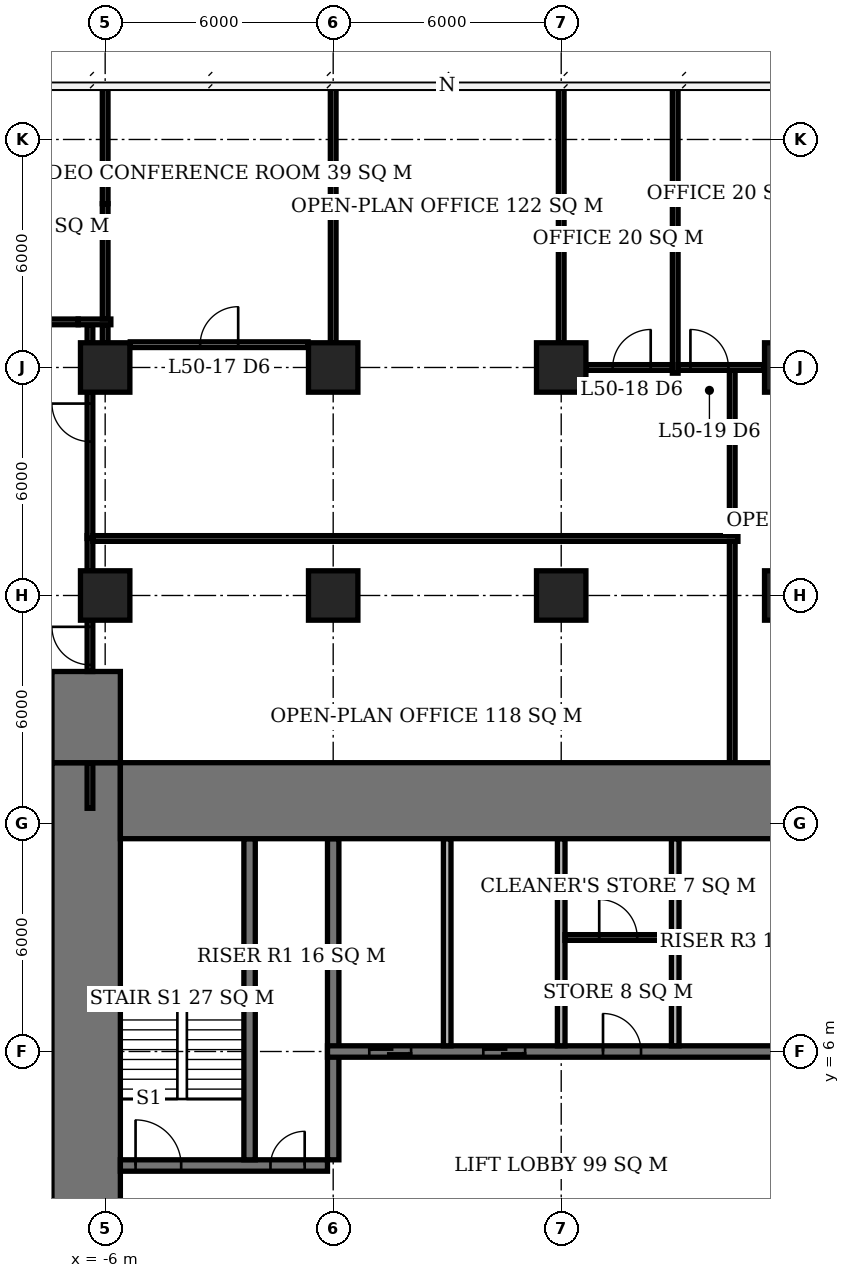
"""IFC4 building model, lengths in metres.
Left out: names, types, materials, properties, quantities, classifications, styles, units other than length and angle.
Written with IfcOpenShell. Run it as: python <this file> out.ifc"""

import sys

from ifc_helpers import new_model, si_unit, direction, frame, frame_2d, origin, origin_2d, place, context, subcontext, project, spatial, rectangle, extrude, element, fill, save


model = new_model("IFC4")
c1 = context("Model", 3, precision=1e-05, world=origin(), true_north=direction((0.0, 1.0)))
c2 = subcontext(c1, "Body", "Model", "MODEL_VIEW")
j1 = project(units=[si_unit("LENGTHUNIT", "METRE"), si_unit("PLANEANGLEUNIT", "RADIAN")], contexts=[c1])
p1 = place(None, origin())
s1 = spatial("IfcSite", under=j1, at=p1, CompositionType="ELEMENT")
p2 = place(p1, origin())
s2 = spatial("IfcBuilding", under=s1, at=p2, CompositionType="ELEMENT")
p3 = place(p2, frame((0.0, 0.0, 204.5)))
s3 = spatial("IfcBuildingStorey", under=s2, at=p3, CompositionType="ELEMENT", Elevation=204.5)
for number, where, z_axis, x_axis in (
    (1, (-6.0, 18.0, 0.0), (0.0, 0.0, 1.0), (1.0, 0.0, 0.0)),
    (2, (-6.0, 24.0, 0.0), (0.0, 0.0, 1.0), (1.0, 0.0, 0.0)),
    (3, (0.0, 18.0, 0.0), (0.0, 0.0, 1.0), (1.0, 0.0, 0.0)),
    (4, (0.0, 24.0, 0.0), (0.0, 0.0, 1.0), (1.0, 0.0, 0.0)),
    (5, (6.0, 18.0, 0.0), (0.0, 0.0, 1.0), (1.0, 0.0, 0.0)),
    (6, (6.0, 24.0, 0.0), (0.0, 0.0, 1.0), (1.0, 0.0, 0.0)),
    (7, (12.0, 18.0, 0.0), (0.0, 0.0, 1.0), (1.0, 0.0, 0.0)),
    (8, (12.0, 24.0, 0.0), (0.0, 0.0, 1.0), (1.0, 0.0, 0.0)),
):
    element("IfcColumn", number, at=place(p3, frame(where, z_axis=z_axis, x_axis=x_axis)), inside=s3, PredefinedType="COLUMN", context=c2, shape_type="SweptSolid", body=[
        extrude(rectangle(XDim=1.3, YDim=1.3, at=origin_2d()), origin(), (0.0, 0.0, 1.0), 3.9),
    ])
p4 = place(p3, frame((-5.6, 12.6, 0.0), z_axis=(0.0, 0.0, 1.0), x_axis=(1.0, 0.0, 0.0)))
e9 = element("IfcWall", 9, at=p4, inside=s3, PredefinedType="SHEAR", context=c2, shape_type="SweptSolid", body=[
    extrude(rectangle(XDim=23.2, YDim=2.0, at=frame_2d((11.6, 0.0))), origin(), (0.0, 0.0, 1.0), 3.9),
])
p5 = place(p3, frame((-6.5, -7.6, 0.0), z_axis=(0.0, 0.0, 1.0), x_axis=(0.0, 1.0, 0.0)))
e10 = element("IfcWall", 10, at=p5, inside=s3, PredefinedType="SHEAR", context=c2, shape_type="SweptSolid", body=[
    extrude(rectangle(XDim=21.2, YDim=1.8, at=frame_2d((10.6, 0.0))), origin(), (0.0, 0.0, 1.0), 3.9),
])
p6 = place(p5, frame((7.8, 0.0, 0.0)))
e11 = element("IfcOpeningElement", 11, at=p6, cuts=e10, PredefinedType="OPENING", context=c2, shape_type="SweptSolid", body=[
    extrude(rectangle(XDim=1.8, YDim=2.4, at=frame_2d((0.9, 1.2))), frame((0.0, 0.91, 0.0), z_axis=(0.0, -1.0, 0.0), x_axis=(1.0, 0.0, 0.0)), (0.0, 0.0, 1.0), 1.82),
])
p7 = place(p3, frame((-6.5, 13.6, 0.0), z_axis=(0.0, 0.0, 1.0), x_axis=(0.0, 1.0, 0.0)))
e12 = element("IfcWall", 12, at=p7, inside=s3, PredefinedType="SHEAR", context=c2, shape_type="SweptSolid", body=[
    extrude(rectangle(XDim=2.4, YDim=1.8, at=frame_2d((1.2, 0.0))), origin(), (0.0, 0.0, 1.0), 3.9),
])
p8 = place(p3, frame((-5.6, 3.0, 0.0), z_axis=(0.0, 0.0, 1.0), x_axis=(1.0, 0.0, 0.0)))
e13 = element("IfcWall", 13, at=p8, inside=s3, PredefinedType="SHEAR", context=c2, shape_type="SweptSolid", body=[
    extrude(rectangle(XDim=5.45, YDim=0.3, at=frame_2d((2.725, 0.0))), origin(), (0.0, 0.0, 1.0), 3.9),
])
p9 = place(p8, frame((0.4, 0.0, 0.0)))
e14 = element("IfcOpeningElement", 14, at=p9, cuts=e13, PredefinedType="OPENING", context=c2, shape_type="SweptSolid", body=[
    extrude(rectangle(XDim=1.2, YDim=2.1, at=frame_2d((0.6, 1.05))), frame((0.0, 0.16, 0.0), z_axis=(0.0, -1.0, 0.0), x_axis=(1.0, 0.0, 0.0)), (0.0, 0.0, 1.0), 0.32),
])
p10 = place(p8, frame((3.95, 0.0, 0.0)))
e15 = element("IfcOpeningElement", 15, at=p10, cuts=e13, PredefinedType="OPENING", context=c2, shape_type="SweptSolid", body=[
    extrude(rectangle(XDim=0.9, YDim=2.1, at=frame_2d((0.45, 1.05))), frame((0.0, 0.16, 0.0), z_axis=(0.0, -1.0, 0.0), x_axis=(1.0, 0.0, 0.0)), (0.0, 0.0, 1.0), 0.32),
])
p11 = place(p3, frame((-0.15, 6.0, 0.0), z_axis=(0.0, 0.0, 1.0), x_axis=(1.0, 0.0, 0.0)))
e16 = element("IfcWall", 16, at=p11, inside=s3, PredefinedType="SHEAR", context=c2, shape_type="SweptSolid", body=[
    extrude(rectangle(XDim=17.75, YDim=0.3, at=frame_2d((8.875, 0.0))), origin(), (0.0, 0.0, 1.0), 3.9),
])
p12 = place(p11, frame((13.15, 0.0, 0.0)))
e17 = element("IfcOpeningElement", 17, at=p12, cuts=e16, PredefinedType="OPENING", context=c2, shape_type="SweptSolid", body=[
    extrude(rectangle(XDim=0.9, YDim=2.1, at=frame_2d((0.45, 1.05))), frame((0.0, 0.16, 0.0), z_axis=(0.0, -1.0, 0.0), x_axis=(1.0, 0.0, 0.0)), (0.0, 0.0, 1.0), 0.32),
])
p13 = place(p11, frame((7.25, 0.0, 0.0)))
e18 = element("IfcOpeningElement", 18, at=p13, cuts=e16, PredefinedType="OPENING", context=c2, shape_type="SweptSolid", body=[
    extrude(rectangle(XDim=1.0, YDim=2.1, at=frame_2d((0.5, 1.05))), frame((0.0, 0.16, 0.0), z_axis=(0.0, -1.0, 0.0), x_axis=(1.0, 0.0, 0.0)), (0.0, 0.0, 1.0), 0.32),
])
p14 = place(p11, frame((1.1, 0.0, 0.0)))
e19 = element("IfcOpeningElement", 19, at=p14, cuts=e16, PredefinedType="OPENING", context=c2, shape_type="SweptSolid", body=[
    extrude(rectangle(XDim=1.1, YDim=2.1, at=frame_2d((0.55, 1.05))), frame((0.0, 0.16, 0.0), z_axis=(0.0, -1.0, 0.0), x_axis=(1.0, 0.0, 0.0)), (0.0, 0.0, 1.0), 0.32),
])
p15 = place(p11, frame((4.1, 0.0, 0.0)))
e20 = element("IfcOpeningElement", 20, at=p15, cuts=e16, PredefinedType="OPENING", context=c2, shape_type="SweptSolid", body=[
    extrude(rectangle(XDim=1.1, YDim=2.1, at=frame_2d((0.55, 1.05))), frame((0.0, 0.16, 0.0), z_axis=(0.0, -1.0, 0.0), x_axis=(1.0, 0.0, 0.0)), (0.0, 0.0, 1.0), 0.32),
])
for number, where, z_axis, x_axis in (
    (21, (0.0, 3.15, 0.0), (0.0, 0.0, 1.0), (0.0, 1.0, 0.0)),
    (22, (-2.2, 3.15, 0.0), (0.0, 0.0, 1.0), (0.0, 1.0, 0.0)),
):
    element("IfcWall", number, at=place(p3, frame(where, z_axis=z_axis, x_axis=x_axis)), inside=s3, PredefinedType="SHEAR", context=c2, shape_type="SweptSolid", body=[
        extrude(rectangle(XDim=8.45, YDim=0.3, at=frame_2d((4.225, 0.0))), origin(), (0.0, 0.0, 1.0), 3.9),
    ])
for number, where, z_axis, x_axis in (
    (23, (3.0, 6.15, 0.0), (0.0, 0.0, 1.0), (0.0, 1.0, 0.0)),
    (24, (6.0, 6.15, 0.0), (0.0, 0.0, 1.0), (0.0, 1.0, 0.0)),
    (25, (9.0, 6.15, 0.0), (0.0, 0.0, 1.0), (0.0, 1.0, 0.0)),
):
    element("IfcWall", number, at=place(p3, frame(where, z_axis=z_axis, x_axis=x_axis)), inside=s3, PredefinedType="SOLIDWALL", context=c2, shape_type="SweptSolid", body=[
        extrude(rectangle(XDim=5.45, YDim=0.2, at=frame_2d((2.725, 0.0))), origin(), (0.0, 0.0, 1.0), 3.9),
    ])
p16 = place(p3, frame((6.1, 9.0, 0.0), z_axis=(0.0, 0.0, 1.0), x_axis=(1.0, 0.0, 0.0)))
e26 = element("IfcWall", 26, at=p16, inside=s3, PredefinedType="PARTITIONING", context=c2, shape_type="SweptSolid", body=[
    extrude(rectangle(XDim=2.8, YDim=0.15, at=frame_2d((1.4, 0.0))), origin(), (0.0, 0.0, 1.0), 3.65),
])
p17 = place(p16, frame((0.9, 0.0, 0.0)))
e27 = element("IfcOpeningElement", 27, at=p17, cuts=e26, PredefinedType="OPENING", context=c2, shape_type="SweptSolid", body=[
    extrude(rectangle(XDim=1.0, YDim=2.1, at=frame_2d((0.5, 1.05))), frame((0.0, 0.085, 0.0), z_axis=(0.0, -1.0, 0.0), x_axis=(1.0, 0.0, 0.0)), (0.0, 0.0, 1.0), 0.17),
])
p18 = place(p3, frame((6.66, 24.0, 0.0), z_axis=(0.0, 0.0, 1.0), x_axis=(1.0, 0.0, 0.0)))
e28 = element("IfcWall", 28, at=p18, inside=s3, PredefinedType="PARTITIONING", context=c2, shape_type="SweptSolid", body=[
    extrude(rectangle(XDim=2.265, YDim=0.15, at=frame_2d((1.133, 0.0))), origin(), (0.0, 0.0, 1.0), 3.65),
])
p19 = place(p18, frame((0.695, 0.0, 0.0)))
e29 = element("IfcOpeningElement", 29, at=p19, cuts=e28, PredefinedType="OPENING", context=c2, shape_type="SweptSolid", body=[
    extrude(rectangle(XDim=1.0, YDim=2.1, at=frame_2d((0.5, 1.05))), frame((0.0, 0.085, 0.0), z_axis=(0.0, -1.0, 0.0), x_axis=(1.0, 0.0, 0.0)), (0.0, 0.0, 1.0), 0.17),
])
p20 = place(p3, frame((9.075, 24.0, 0.0), z_axis=(0.0, 0.0, 1.0), x_axis=(1.0, 0.0, 0.0)))
e30 = element("IfcWall", 30, at=p20, inside=s3, PredefinedType="PARTITIONING", context=c2, shape_type="SweptSolid", body=[
    extrude(rectangle(XDim=2.265, YDim=0.15, at=frame_2d((1.133, 0.0))), origin(), (0.0, 0.0, 1.0), 3.65),
])
p21 = place(p20, frame((0.325, 0.0, 0.0)))
e31 = element("IfcOpeningElement", 31, at=p21, cuts=e30, PredefinedType="OPENING", context=c2, shape_type="SweptSolid", body=[
    extrude(rectangle(XDim=1.0, YDim=2.1, at=frame_2d((0.5, 1.05))), frame((0.0, 0.085, 0.0), z_axis=(0.0, -1.0, 0.0), x_axis=(1.0, 0.0, 0.0)), (0.0, 0.0, 1.0), 0.17),
])
p22 = place(p3, frame((-5.34, 24.6, 0.0), z_axis=(0.0, 0.0, 1.0), x_axis=(1.0, 0.0, 0.0)))
e32 = element("IfcWall", 32, at=p22, inside=s3, PredefinedType="PARTITIONING", context=c2, shape_type="SweptSolid", body=[
    extrude(rectangle(XDim=4.68, YDim=0.15, at=frame_2d((2.34, 0.0))), origin(), (0.0, 0.0, 1.0), 3.65),
])
p23 = place(p22, frame((1.84, 0.0, 0.0)))
e33 = element("IfcOpeningElement", 33, at=p23, cuts=e32, PredefinedType="OPENING", context=c2, shape_type="SweptSolid", body=[
    extrude(rectangle(XDim=1.0, YDim=2.1, at=frame_2d((0.5, 1.05))), frame((0.0, 0.085, 0.0), z_axis=(0.0, -1.0, 0.0), x_axis=(1.0, 0.0, 0.0)), (0.0, 0.0, 1.0), 0.17),
])
p24 = place(p3, frame((-11.49, 25.2, 0.0), z_axis=(0.0, 0.0, 1.0), x_axis=(1.0, 0.0, 0.0)))
e34 = element("IfcWall", 34, at=p24, inside=s3, PredefinedType="PARTITIONING", context=c2, shape_type="SweptSolid", body=[
    extrude(rectangle(XDim=4.78, YDim=0.15, at=frame_2d((2.39, 0.0))), origin(), (0.0, 0.0, 1.0), 3.65),
])
p25 = place(p24, frame((1.89, 0.0, 0.0)))
e35 = element("IfcOpeningElement", 35, at=p25, cuts=e34, PredefinedType="OPENING", context=c2, shape_type="SweptSolid", body=[
    extrude(rectangle(XDim=1.0, YDim=2.1, at=frame_2d((0.5, 1.05))), frame((0.0, 0.085, 0.0), z_axis=(0.0, -1.0, 0.0), x_axis=(1.0, 0.0, 0.0)), (0.0, 0.0, 1.0), 0.17),
])
p26 = place(p3, frame((-6.71, 25.2, 0.0), z_axis=(0.0, 0.0, 1.0), x_axis=(1.0, 0.0, 0.0)))
e36 = element("IfcWall", 36, at=p26, inside=s3, PredefinedType="PARTITIONING", context=c2, shape_type="SweptSolid", body=[
    extrude(rectangle(XDim=0.86, YDim=0.15, at=frame_2d((0.43, 0.0))), origin(), (0.0, 0.0, 1.0), 2.65),
])
p27 = place(p3, frame((-6.0, 24.65, 0.0), z_axis=(0.0, 0.0, 1.0), x_axis=(0.0, 1.0, 0.0)))
e37 = element("IfcWall", 37, at=p27, inside=s3, PredefinedType="PARTITIONING", context=c2, shape_type="SweptSolid", body=[
    extrude(rectangle(XDim=0.475, YDim=0.15, at=frame_2d((0.238, 0.0))), origin(), (0.0, 0.0, 1.0), 2.65),
])
p28 = place(p3, frame((-6.0, 25.275, 0.0), z_axis=(0.0, 0.0, 1.0), x_axis=(0.0, 1.0, 0.0)))
e38 = element("IfcWall", 38, at=p28, inside=s3, PredefinedType="PARTITIONING", context=c2, shape_type="SweptSolid", body=[
    extrude(rectangle(XDim=3.035, YDim=0.15, at=frame_2d((1.518, 0.0))), origin(), (0.0, 0.0, 1.0), 2.65),
])
p29 = place(p3, frame((-6.0, 28.31, 0.0), z_axis=(0.0, 0.0, 1.0), x_axis=(0.0, 1.0, 0.0)))
e39 = element("IfcWall", 39, at=p29, inside=s3, PredefinedType="PARTITIONING", context=c2, shape_type="SweptSolid", body=[
    extrude(rectangle(XDim=3.09, YDim=0.15, at=frame_2d((1.545, 0.0))), origin(), (0.0, 0.0, 1.0), 3.65),
])
p30 = place(p3, frame((0.0, 24.65, 0.0), z_axis=(0.0, 0.0, 1.0), x_axis=(0.0, 1.0, 0.0)))
e40 = element("IfcWall", 40, at=p30, inside=s3, PredefinedType="PARTITIONING", context=c2, shape_type="SweptSolid", body=[
    extrude(rectangle(XDim=3.66, YDim=0.15, at=frame_2d((1.83, 0.0))), origin(), (0.0, 0.0, 1.0), 2.65),
])
p31 = place(p3, frame((0.0, 28.31, 0.0), z_axis=(0.0, 0.0, 1.0), x_axis=(0.0, 1.0, 0.0)))
e41 = element("IfcWall", 41, at=p31, inside=s3, PredefinedType="PARTITIONING", context=c2, shape_type="SweptSolid", body=[
    extrude(rectangle(XDim=3.04, YDim=0.15, at=frame_2d((1.52, 0.0))), origin(), (0.0, 0.0, 1.0), 3.65),
])
p32 = place(p3, frame((6.0, 24.65, 0.0), z_axis=(0.0, 0.0, 1.0), x_axis=(0.0, 1.0, 0.0)))
e42 = element("IfcWall", 42, at=p32, inside=s3, PredefinedType="PARTITIONING", context=c2, shape_type="SweptSolid", body=[
    extrude(rectangle(XDim=3.66, YDim=0.15, at=frame_2d((1.83, 0.0))), origin(), (0.0, 0.0, 1.0), 2.65),
])
p33 = place(p3, frame((6.0, 28.31, 0.0), z_axis=(0.0, 0.0, 1.0), x_axis=(0.0, 1.0, 0.0)))
e43 = element("IfcWall", 43, at=p33, inside=s3, PredefinedType="PARTITIONING", context=c2, shape_type="SweptSolid", body=[
    extrude(rectangle(XDim=3.04, YDim=0.15, at=frame_2d((1.52, 0.0))), origin(), (0.0, 0.0, 1.0), 3.65),
])
p34 = place(p3, frame((9.0, 23.85, 0.0), z_axis=(0.0, 0.0, 1.0), x_axis=(0.0, 1.0, 0.0)))
e44 = element("IfcWall", 44, at=p34, inside=s3, PredefinedType="PARTITIONING", context=c2, shape_type="SweptSolid", body=[
    extrude(rectangle(XDim=3.74, YDim=0.15, at=frame_2d((1.87, 0.0))), origin(), (0.0, 0.0, 1.0), 3.65),
])
p35 = place(p3, frame((9.0, 27.59, 0.0), z_axis=(0.0, 0.0, 1.0), x_axis=(0.0, 1.0, 0.0)))
e45 = element("IfcWall", 45, at=p35, inside=s3, PredefinedType="PARTITIONING", context=c2, shape_type="SweptSolid", body=[
    extrude(rectangle(XDim=0.72, YDim=0.15, at=frame_2d((0.36, 0.0))), origin(), (0.0, 0.0, 1.0), 2.65),
])
p36 = place(p3, frame((9.0, 28.31, 0.0), z_axis=(0.0, 0.0, 1.0), x_axis=(0.0, 1.0, 0.0)))
e46 = element("IfcWall", 46, at=p36, inside=s3, PredefinedType="PARTITIONING", context=c2, shape_type="SweptSolid", body=[
    extrude(rectangle(XDim=3.09, YDim=0.15, at=frame_2d((1.545, 0.0))), origin(), (0.0, 0.0, 1.0), 3.65),
])
p37 = place(p3, frame((-6.4, 12.4, 0.0), z_axis=(0.0, 0.0, 1.0), x_axis=(0.0, 1.0, 0.0)))
e47 = element("IfcWall", 47, at=p37, inside=s3, PredefinedType="PARTITIONING", context=c2, shape_type="SweptSolid", body=[
    extrude(rectangle(XDim=1.2, YDim=0.15, at=frame_2d((0.6, 0.0))), origin(), (0.0, 0.0, 1.0), 3.65),
])
p38 = place(p3, frame((-6.4, 16.0, 0.0), z_axis=(0.0, 0.0, 1.0), x_axis=(0.0, 1.0, 0.0)))
e48 = element("IfcWall", 48, at=p38, inside=s3, PredefinedType="PARTITIONING", context=c2, shape_type="SweptSolid", body=[
    extrude(rectangle(XDim=1.35, YDim=0.15, at=frame_2d((0.675, 0.0))), origin(), (0.0, 0.0, 1.0), 3.65),
])
p39 = place(p38, frame((0.175, 0.0, 0.0)))
e49 = element("IfcOpeningElement", 49, at=p39, cuts=e48, PredefinedType="OPENING", context=c2, shape_type="SweptSolid", body=[
    extrude(rectangle(XDim=1.0, YDim=2.1, at=frame_2d((0.5, 1.05))), frame((0.0, 0.085, 0.0), z_axis=(0.0, -1.0, 0.0), x_axis=(1.0, 0.0, 0.0)), (0.0, 0.0, 1.0), 0.17),
])
p40 = place(p3, frame((-6.4, 18.65, 0.0), z_axis=(0.0, 0.0, 1.0), x_axis=(0.0, 1.0, 0.0)))
e50 = element("IfcWall", 50, at=p40, inside=s3, PredefinedType="PARTITIONING", context=c2, shape_type="SweptSolid", body=[
    extrude(rectangle(XDim=0.925, YDim=0.15, at=frame_2d((0.462, 0.0))), origin(), (0.0, 0.0, 1.0), 3.65),
])
p41 = place(p3, frame((-6.4, 19.5, 0.0), z_axis=(0.0, 0.0, 1.0), x_axis=(0.0, 1.0, 0.0)))
e51 = element("IfcWall", 51, at=p41, inside=s3, PredefinedType="PARTITIONING", context=c2, shape_type="SweptSolid", body=[
    extrude(rectangle(XDim=3.85, YDim=0.15, at=frame_2d((1.925, 0.0))), origin(), (0.0, 0.0, 1.0), 3.65),
])
p42 = place(p41, frame((2.55, 0.0, 0.0)))
e52 = element("IfcOpeningElement", 52, at=p42, cuts=e51, PredefinedType="OPENING", context=c2, shape_type="SweptSolid", body=[
    extrude(rectangle(XDim=1.0, YDim=2.1, at=frame_2d((0.5, 1.05))), frame((0.0, 0.085, 0.0), z_axis=(0.0, -1.0, 0.0), x_axis=(1.0, 0.0, 0.0)), (0.0, 0.0, 1.0), 0.17),
])
p43 = place(p3, frame((-6.4, 24.65, 0.0), z_axis=(0.0, 0.0, 1.0), x_axis=(0.0, 1.0, 0.0)))
e53 = element("IfcWall", 53, at=p43, inside=s3, PredefinedType="PARTITIONING", context=c2, shape_type="SweptSolid", body=[
    extrude(rectangle(XDim=0.475, YDim=0.15, at=frame_2d((0.238, 0.0))), origin(), (0.0, 0.0, 1.0), 2.65),
])
p44 = place(p3, frame((-6.325, 19.5, 0.0), z_axis=(0.0, 0.0, 1.0), x_axis=(1.0, 0.0, 0.0)))
e54 = element("IfcWall", 54, at=p44, inside=s3, PredefinedType="PARTITIONING", context=c2, shape_type="SweptSolid", body=[
    extrude(rectangle(XDim=16.975, YDim=0.15, at=frame_2d((8.487, 0.0))), origin(), (0.0, 0.0, 1.0), 3.65),
])
p45 = place(p3, frame((10.5, 12.4, 0.0), z_axis=(0.0, 0.0, 1.0), x_axis=(0.0, 1.0, 0.0)))
e55 = element("IfcWall", 55, at=p45, inside=s3, PredefinedType="PARTITIONING", context=c2, shape_type="SweptSolid", body=[
    extrude(rectangle(XDim=7.025, YDim=0.15, at=frame_2d((3.513, 0.0))), origin(), (0.0, 0.0, 1.0), 3.65),
])
p46 = place(p3, frame((10.5, 19.575, 0.0), z_axis=(0.0, 0.0, 1.0), x_axis=(0.0, 1.0, 0.0)))
e56 = element("IfcWall", 56, at=p46, inside=s3, PredefinedType="PARTITIONING", context=c2, shape_type="SweptSolid", body=[
    extrude(rectangle(XDim=4.35, YDim=0.15, at=frame_2d((2.175, 0.0))), origin(), (0.0, 0.0, 1.0), 3.65),
])
p47 = place(p9, origin())
e57 = element("IfcDoor", 57, at=p47, inside=s3, OperationType="SINGLE_SWING_LEFT", PredefinedType="DOOR", context=c2, shape_type="SweptSolid", body=[
    extrude(rectangle(XDim=1.2, YDim=2.1, at=frame_2d((0.6, 1.05))), frame((0.0, 0.025, 0.0), z_axis=(0.0, -1.0, 0.0), x_axis=(1.0, 0.0, 0.0)), (0.0, 0.0, 1.0), 0.05),
])
fill(e14, e57)
p48 = place(p10, origin())
e58 = element("IfcDoor", 58, at=p48, inside=s3, OperationType="SINGLE_SWING_RIGHT", PredefinedType="DOOR", context=c2, shape_type="SweptSolid", body=[
    extrude(rectangle(XDim=0.9, YDim=2.1, at=frame_2d((0.45, 1.05))), frame((0.0, 0.025, 0.0), z_axis=(0.0, -1.0, 0.0), x_axis=(1.0, 0.0, 0.0)), (0.0, 0.0, 1.0), 0.05),
])
fill(e15, e58)
p49 = place(p17, origin())
e59 = element("IfcDoor", 59, at=p49, inside=s3, OperationType="SINGLE_SWING_LEFT", PredefinedType="DOOR", context=c2, shape_type="SweptSolid", body=[
    extrude(rectangle(XDim=1.0, YDim=2.1, at=frame_2d((0.5, 1.05))), frame((0.0, 0.025, 0.0), z_axis=(0.0, -1.0, 0.0), x_axis=(1.0, 0.0, 0.0)), (0.0, 0.0, 1.0), 0.05),
])
fill(e27, e59)
p50 = place(p13, origin())
e60 = element("IfcDoor", 60, at=p50, inside=s3, OperationType="SINGLE_SWING_LEFT", PredefinedType="DOOR", context=c2, shape_type="SweptSolid", body=[
    extrude(rectangle(XDim=1.0, YDim=2.1, at=frame_2d((0.5, 1.05))), frame((0.0, 0.025, 0.0), z_axis=(0.0, -1.0, 0.0), x_axis=(1.0, 0.0, 0.0)), (0.0, 0.0, 1.0), 0.05),
])
fill(e18, e60)
p51 = place(p14, origin())
e61 = element("IfcDoor", 61, at=p51, inside=s3, OperationType="DOUBLE_DOOR_SLIDING", PredefinedType="USERDEFINED", context=c2, shape_type="SweptSolid", body=[
    extrude(rectangle(XDim=1.1, YDim=2.1, at=frame_2d((0.55, 1.05))), frame((0.0, 0.025, 0.0), z_axis=(0.0, -1.0, 0.0), x_axis=(1.0, 0.0, 0.0)), (0.0, 0.0, 1.0), 0.05),
])
fill(e19, e61)
p52 = place(p15, origin())
e62 = element("IfcDoor", 62, at=p52, inside=s3, OperationType="DOUBLE_DOOR_SLIDING", PredefinedType="USERDEFINED", context=c2, shape_type="SweptSolid", body=[
    extrude(rectangle(XDim=1.1, YDim=2.1, at=frame_2d((0.55, 1.05))), frame((0.0, 0.025, 0.0), z_axis=(0.0, -1.0, 0.0), x_axis=(1.0, 0.0, 0.0)), (0.0, 0.0, 1.0), 0.05),
])
fill(e20, e62)
p53 = place(p23, origin())
e63 = element("IfcDoor", 63, at=p53, inside=s3, OperationType="SINGLE_SWING_RIGHT", PredefinedType="DOOR", context=c2, shape_type="SweptSolid", body=[
    extrude(rectangle(XDim=1.0, YDim=2.1, at=frame_2d((0.5, 1.05))), frame((0.0, 0.025, 0.0), z_axis=(0.0, -1.0, 0.0), x_axis=(1.0, 0.0, 0.0)), (0.0, 0.0, 1.0), 0.05),
])
fill(e33, e63)
p54 = place(p19, origin())
e64 = element("IfcDoor", 64, at=p54, inside=s3, OperationType="SINGLE_SWING_RIGHT", PredefinedType="DOOR", context=c2, shape_type="SweptSolid", body=[
    extrude(rectangle(XDim=1.0, YDim=2.1, at=frame_2d((0.5, 1.05))), frame((0.0, 0.025, 0.0), z_axis=(0.0, -1.0, 0.0), x_axis=(1.0, 0.0, 0.0)), (0.0, 0.0, 1.0), 0.05),
])
fill(e29, e64)
p55 = place(p21, origin())
e65 = element("IfcDoor", 65, at=p55, inside=s3, OperationType="SINGLE_SWING_LEFT", PredefinedType="DOOR", context=c2, shape_type="SweptSolid", body=[
    extrude(rectangle(XDim=1.0, YDim=2.1, at=frame_2d((0.5, 1.05))), frame((0.0, 0.025, 0.0), z_axis=(0.0, -1.0, 0.0), x_axis=(1.0, 0.0, 0.0)), (0.0, 0.0, 1.0), 0.05),
])
fill(e31, e65)
p56 = place(p42, origin())
e66 = element("IfcDoor", 66, at=p56, inside=s3, OperationType="SINGLE_SWING_RIGHT", PredefinedType="DOOR", context=c2, shape_type="SweptSolid", body=[
    extrude(rectangle(XDim=1.0, YDim=2.1, at=frame_2d((0.5, 1.05))), frame((0.0, 0.025, 0.0), z_axis=(0.0, -1.0, 0.0), x_axis=(1.0, 0.0, 0.0)), (0.0, 0.0, 1.0), 0.05),
])
fill(e52, e66)
p57 = place(p39, origin())
e67 = element("IfcDoor", 67, at=p57, inside=s3, OperationType="SINGLE_SWING_RIGHT", PredefinedType="DOOR", context=c2, shape_type="SweptSolid", body=[
    extrude(rectangle(XDim=1.0, YDim=2.1, at=frame_2d((0.5, 1.05))), frame((0.0, 0.025, 0.0), z_axis=(0.0, -1.0, 0.0), x_axis=(1.0, 0.0, 0.0)), (0.0, 0.0, 1.0), 0.05),
])
fill(e49, e67)
save(model, sys.argv[1])
